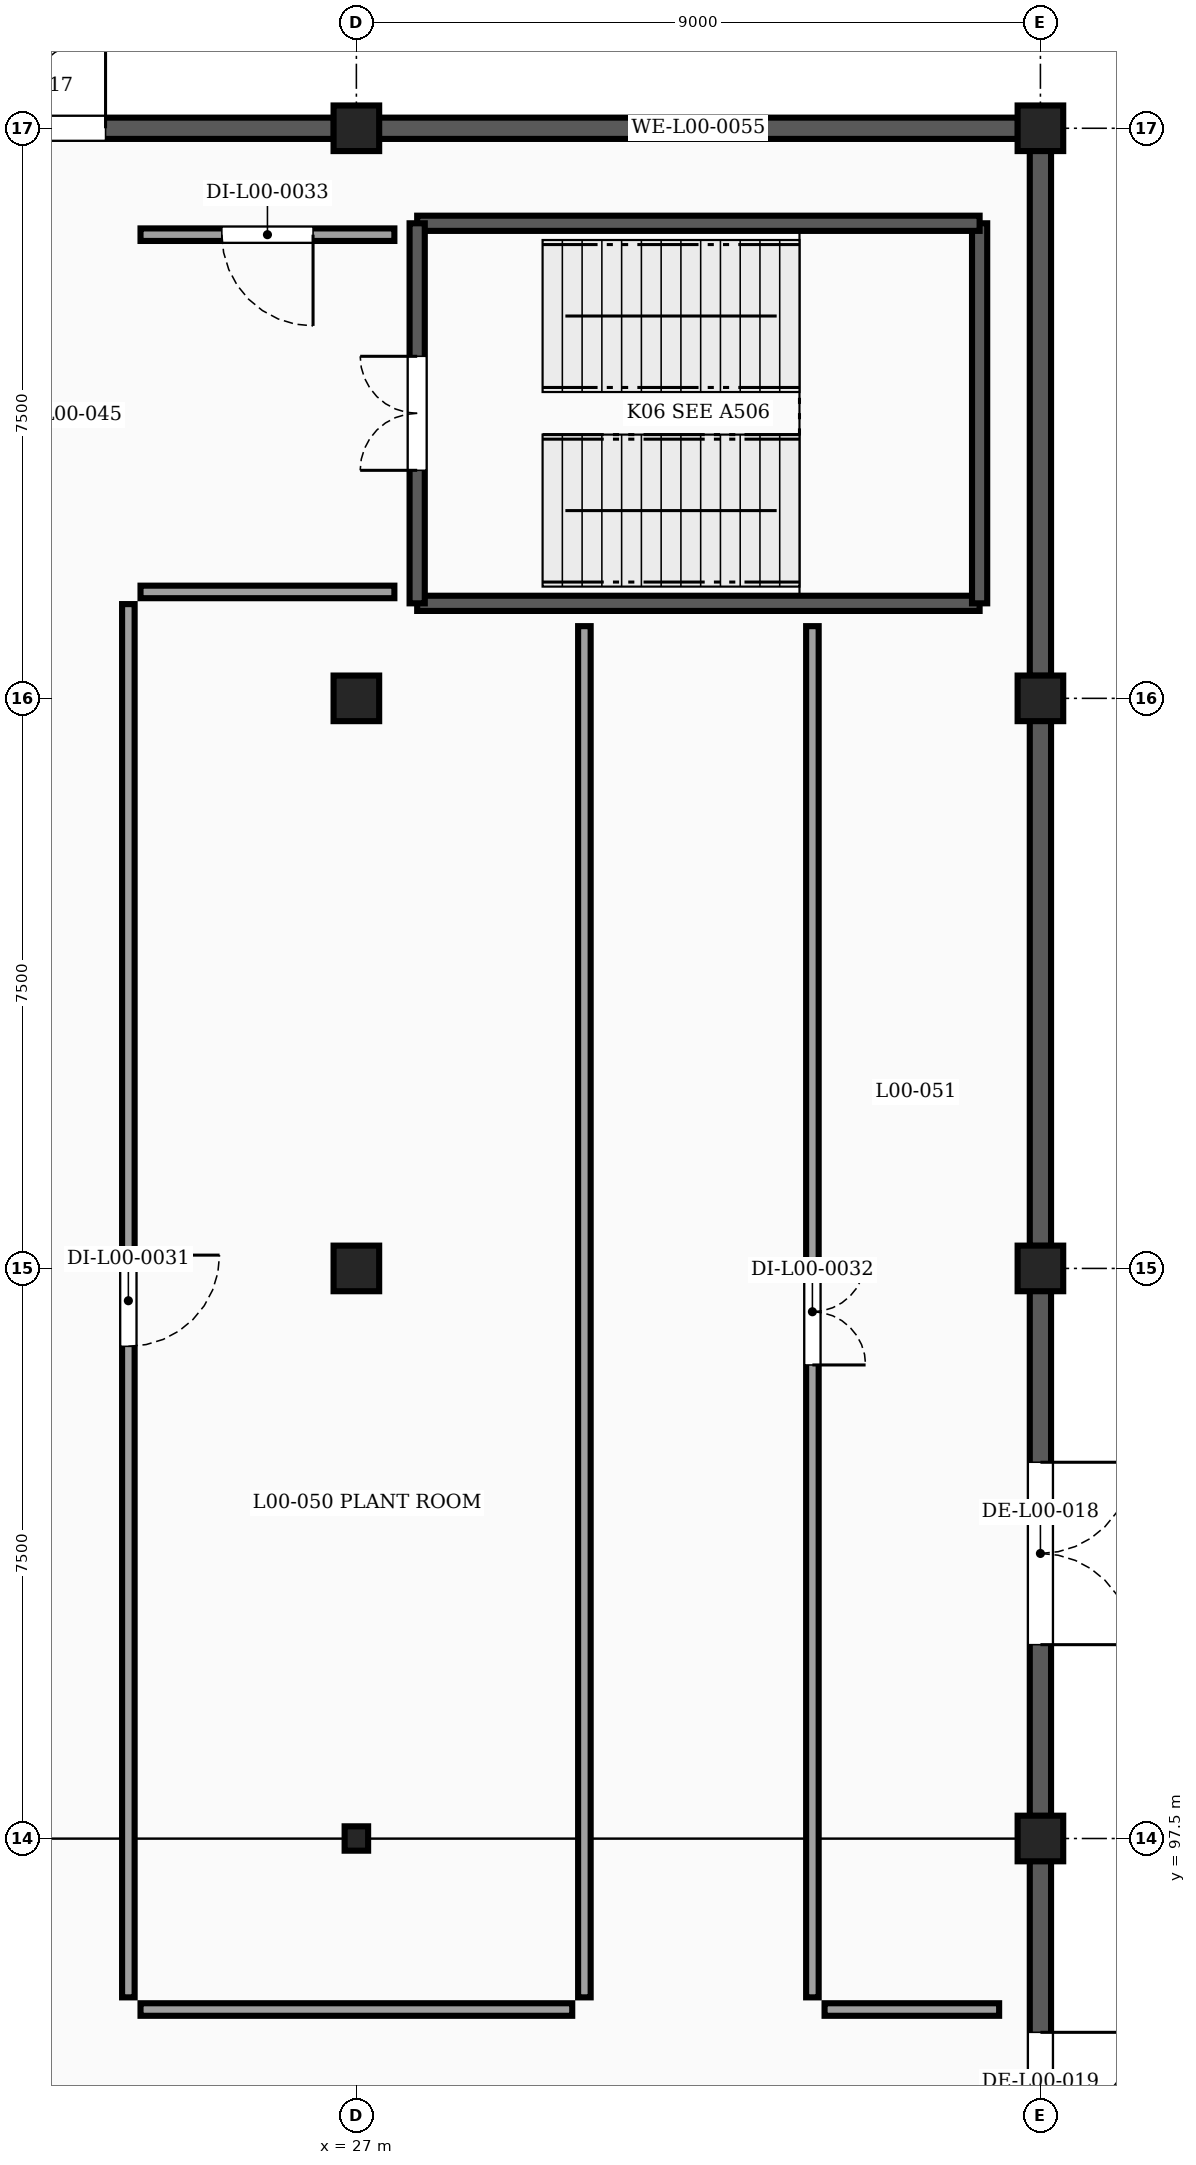
"""IFC4 building model, lengths in metres.
Left out: names, types, materials, properties, quantities, classifications, styles, units other than length and angle.
Written with IfcOpenShell. Run it as: python <this file> out.ifc"""

import sys

from ifc_helpers import new_model, si_unit, direction, frame, frame_2d, origin, origin_2d, place, context, subcontext, project, spatial, rectangle, i_section, extrude, element, fill, save


model = new_model("IFC4")
c1 = context("Model", 3, precision=1e-05, world=origin(), true_north=direction((0.0, 1.0)))
c2 = subcontext(c1, "Body", "Model", "MODEL_VIEW")
j1 = project(units=[si_unit("LENGTHUNIT", "METRE"), si_unit("PLANEANGLEUNIT", "RADIAN")], contexts=[c1])
p1 = place(None, origin())
s1 = spatial("IfcSite", under=j1, at=p1, CompositionType="ELEMENT")
p2 = place(p1, origin())
s2 = spatial("IfcBuilding", under=s1, at=p2, CompositionType="ELEMENT")
p3 = place(p2, origin())
s3 = spatial("IfcBuildingStorey", under=s2, at=p3, CompositionType="ELEMENT", Elevation=0.0)
p4 = place(p3, frame((27.0, 97.5, -0.25), z_axis=(0.0, 0.0, 1.0), x_axis=(1.0, 0.0, 0.0)))
e1 = element("IfcColumn", 1, at=p4, inside=s3, PredefinedType="COLUMN", context=c2, shape_type="SweptSolid", body=[
    extrude(i_section(OverallWidth=0.309, OverallDepth=0.321, WebThickness=0.014, FlangeThickness=0.022, FilletRadius=0.017, at=origin_2d()), origin(), (0.0, 0.0, 1.0), 4.75),
])
for number, where, z_axis, x_axis in (
    (2, (36.0, 97.5, -0.25), (0.0, 0.0, 1.0), (1.0, 0.0, 0.0)),
    (3, (27.0, 105.0, -0.25), (0.0, 0.0, 1.0), (1.0, 0.0, 0.0)),
    (4, (36.0, 105.0, -0.25), (0.0, 0.0, 1.0), (1.0, 0.0, 0.0)),
    (5, (27.0, 112.5, -0.25), (0.0, 0.0, 1.0), (1.0, 0.0, 0.0)),
    (6, (36.0, 112.5, -0.25), (0.0, 0.0, 1.0), (1.0, 0.0, 0.0)),
    (7, (27.0, 120.0, -0.25), (0.0, 0.0, 1.0), (1.0, 0.0, 0.0)),
    (8, (36.0, 120.0, -0.25), (0.0, 0.0, 1.0), (1.0, 0.0, 0.0)),
):
    element("IfcColumn", number, at=place(p3, frame(where, z_axis=z_axis, x_axis=x_axis)), inside=s3, PredefinedType="COLUMN", context=c2, shape_type="SweptSolid", body=[
        extrude(rectangle(XDim=0.6, YDim=0.6, at=origin_2d()), origin(), (0.0, 0.0, 1.0), 4.75),
    ])
p5 = place(p3, frame((18.296, 120.0, 0.0), z_axis=(0.0, 0.0, 1.0), x_axis=(1.0, 0.0, 0.0)))
e9 = element("IfcWall", 9, at=p5, inside=s3, PredefinedType="SOLIDWALL", context=c2, shape_type="SweptSolid", body=[
    extrude(rectangle(XDim=8.408, YDim=0.28, at=frame_2d((4.204, 0.0))), origin(), (0.0, 0.0, 1.0), 3.442),
])
p6 = place(p5, frame((3.004, 0.0, 0.0)))
e10 = element("IfcOpeningElement", 10, at=p6, cuts=e9, PredefinedType="OPENING", context=c2, shape_type="SweptSolid", body=[
    extrude(rectangle(XDim=2.4, YDim=2.2, at=frame_2d((1.2, 1.1))), frame((0.0, 0.15, 0.0), z_axis=(0.0, -1.0, 0.0), x_axis=(1.0, 0.0, 0.0)), (0.0, 0.0, 1.0), 0.3),
])
p7 = place(p3, frame((27.296, 120.0, 0.0), z_axis=(0.0, 0.0, 1.0), x_axis=(1.0, 0.0, 0.0)))
e11 = element("IfcWall", 11, at=p7, inside=s3, PredefinedType="SOLIDWALL", context=c2, shape_type="SweptSolid", body=[
    extrude(rectangle(XDim=8.408, YDim=0.28, at=frame_2d((4.204, 0.0))), origin(), (0.0, 0.0, 1.0), 3.442),
])
for number, where, z_axis, x_axis in (
    (12, (36.0, 119.704, 0.0), (0.0, 0.0, 1.0), (0.0, -1.0, 0.0)),
    (13, (36.0, 112.204, 0.0), (0.0, 0.0, 1.0), (0.0, -1.0, 0.0)),
):
    element("IfcWall", number, at=place(p3, frame(where, z_axis=z_axis, x_axis=x_axis)), inside=s3, PredefinedType="SOLIDWALL", context=c2, shape_type="SweptSolid", body=[
        extrude(rectangle(XDim=6.908, YDim=0.28, at=frame_2d((3.454, 0.0))), origin(), (0.0, 0.0, 1.0), 3.442),
    ])
p8 = place(p3, frame((36.0, 104.704, 0.0), z_axis=(0.0, 0.0, 1.0), x_axis=(0.0, -1.0, 0.0)))
e14 = element("IfcWall", 14, at=p8, inside=s3, PredefinedType="SOLIDWALL", context=c2, shape_type="SweptSolid", body=[
    extrude(rectangle(XDim=6.908, YDim=0.28, at=frame_2d((3.454, 0.0))), origin(), (0.0, 0.0, 1.0), 3.442),
])
p9 = place(p8, frame((2.254, 0.0, 0.0)))
e15 = element("IfcOpeningElement", 15, at=p9, cuts=e14, PredefinedType="OPENING", context=c2, shape_type="SweptSolid", body=[
    extrude(rectangle(XDim=2.4, YDim=2.25, at=frame_2d((1.2, 1.125))), frame((0.0, 0.15, 0.0), z_axis=(0.0, -1.0, 0.0), x_axis=(1.0, 0.0, 0.0)), (0.0, 0.0, 1.0), 0.3),
])
p10 = place(p3, frame((36.0, 97.204, 0.0), z_axis=(0.0, 0.0, 1.0), x_axis=(0.0, -1.0, 0.0)))
e16 = element("IfcWall", 16, at=p10, inside=s3, PredefinedType="SOLIDWALL", context=c2, shape_type="SweptSolid", body=[
    extrude(rectangle(XDim=6.908, YDim=0.28, at=frame_2d((3.454, 0.0))), origin(), (0.0, 0.0, 1.0), 3.442),
])
p11 = place(p10, frame((2.254, 0.0, 0.0)))
e17 = element("IfcOpeningElement", 17, at=p11, cuts=e16, PredefinedType="OPENING", context=c2, shape_type="SweptSolid", body=[
    extrude(rectangle(XDim=2.4, YDim=2.25, at=frame_2d((1.2, 1.125))), frame((0.0, 0.15, 0.0), z_axis=(0.0, -1.0, 0.0), x_axis=(1.0, 0.0, 0.0)), (0.0, 0.0, 1.0), 0.3),
])
p12 = place(p3, frame((27.8, 113.75, 0.0), z_axis=(0.0, 0.0, 1.0), x_axis=(1.0, 0.0, 0.0)))
e18 = element("IfcWall", 18, at=p12, inside=s3, PredefinedType="SHEAR", context=c2, shape_type="SweptSolid", body=[
    extrude(rectangle(XDim=7.4, YDim=0.2, at=frame_2d((3.7, 0.0))), origin(), (0.0, 0.0, 1.0), 4.1),
])
p13 = place(p3, frame((35.2, 113.75, 0.0), z_axis=(0.0, 0.0, 1.0), x_axis=(0.0, 1.0, 0.0)))
e19 = element("IfcWall", 19, at=p13, inside=s3, PredefinedType="SHEAR", context=c2, shape_type="SweptSolid", body=[
    extrude(rectangle(XDim=5.0, YDim=0.2, at=frame_2d((2.5, 0.0))), origin(), (0.0, 0.0, 1.0), 4.1),
])
p14 = place(p3, frame((35.2, 118.75, 0.0), z_axis=(0.0, 0.0, 1.0), x_axis=(-1.0, 0.0, 0.0)))
e20 = element("IfcWall", 20, at=p14, inside=s3, PredefinedType="SHEAR", context=c2, shape_type="SweptSolid", body=[
    extrude(rectangle(XDim=7.4, YDim=0.2, at=frame_2d((3.7, 0.0))), origin(), (0.0, 0.0, 1.0), 4.1),
])
p15 = place(p3, frame((27.8, 113.75, 0.0), z_axis=(0.0, 0.0, 1.0), x_axis=(0.0, 1.0, 0.0)))
e21 = element("IfcWall", 21, at=p15, inside=s3, PredefinedType="SHEAR", context=c2, shape_type="SweptSolid", body=[
    extrude(rectangle(XDim=5.0, YDim=0.2, at=frame_2d((2.5, 0.0))), origin(), (0.0, 0.0, 1.0), 4.1),
])
p16 = place(p15, frame((1.75, 0.0, 0.0)))
e22 = element("IfcOpeningElement", 22, at=p16, cuts=e21, PredefinedType="OPENING", context=c2, shape_type="SweptSolid", body=[
    extrude(rectangle(XDim=1.5, YDim=2.15, at=frame_2d((0.75, 1.075))), frame((0.0, 0.11, 0.0), z_axis=(0.0, -1.0, 0.0), x_axis=(1.0, 0.0, 0.0)), (0.0, 0.0, 1.0), 0.22),
])
p17 = place(p3, frame((27.5, 113.9, 0.0), z_axis=(0.0, 0.0, 1.0), x_axis=(-1.0, 0.0, 0.0)))
e23 = element("IfcWall", 23, at=p17, inside=s3, PredefinedType="PARTITIONING", context=c2, shape_type="SweptSolid", body=[
    extrude(rectangle(XDim=3.34, YDim=0.165, at=frame_2d((1.67, 0.0))), origin(), (0.0, 0.0, 1.0), 4.1),
])
p18 = place(p3, frame((24.0, 113.74, 0.0), z_axis=(0.0, 0.0, 1.0), x_axis=(0.0, -1.0, 0.0)))
e24 = element("IfcWall", 24, at=p18, inside=s3, PredefinedType="PARTITIONING", context=c2, shape_type="SweptSolid", body=[
    extrude(rectangle(XDim=18.33, YDim=0.165, at=frame_2d((9.165, 0.0))), origin(), (0.0, 0.0, 1.0), 3.642),
])
p19 = place(p18, frame((8.565, 0.0, 0.0)))
e25 = element("IfcOpeningElement", 25, at=p19, cuts=e24, PredefinedType="OPENING", context=c2, shape_type="SweptSolid", body=[
    extrude(rectangle(XDim=1.2, YDim=2.15, at=frame_2d((0.6, 1.075))), frame((0.0, 0.093, 0.0), z_axis=(0.0, -1.0, 0.0), x_axis=(1.0, 0.0, 0.0)), (0.0, 0.0, 1.0), 0.185),
])
p20 = place(p3, frame((24.16, 95.25, 0.0), z_axis=(0.0, 0.0, 1.0), x_axis=(1.0, 0.0, 0.0)))
e26 = element("IfcWall", 26, at=p20, inside=s3, PredefinedType="PARTITIONING", context=c2, shape_type="SweptSolid", body=[
    extrude(rectangle(XDim=5.68, YDim=0.165, at=frame_2d((2.84, 0.0))), origin(), (0.0, 0.0, 1.0), 4.1),
])
p21 = place(p3, frame((30.0, 95.41, 0.0), z_axis=(0.0, 0.0, 1.0), x_axis=(0.0, 1.0, 0.0)))
e27 = element("IfcWall", 27, at=p21, inside=s3, PredefinedType="PARTITIONING", context=c2, shape_type="SweptSolid", body=[
    extrude(rectangle(XDim=18.04, YDim=0.165, at=frame_2d((9.02, 0.0))), origin(), (0.0, 0.0, 1.0), 3.642),
])
p22 = place(p3, frame((33.0, 113.45, 0.0), z_axis=(0.0, 0.0, 1.0), x_axis=(0.0, -1.0, 0.0)))
e28 = element("IfcWall", 28, at=p22, inside=s3, PredefinedType="PARTITIONING", context=c2, shape_type="SweptSolid", body=[
    extrude(rectangle(XDim=18.04, YDim=0.165, at=frame_2d((9.02, 0.0))), origin(), (0.0, 0.0, 1.0), 3.642),
])
p23 = place(p22, frame((8.32, 0.0, 0.0)))
e29 = element("IfcOpeningElement", 29, at=p23, cuts=e28, PredefinedType="OPENING", context=c2, shape_type="SweptSolid", body=[
    extrude(rectangle(XDim=1.4, YDim=2.15, at=frame_2d((0.7, 1.075))), frame((0.0, 0.093, 0.0), z_axis=(0.0, -1.0, 0.0), x_axis=(1.0, 0.0, 0.0)), (0.0, 0.0, 1.0), 0.185),
])
p24 = place(p3, frame((33.16, 95.25, 0.0), z_axis=(0.0, 0.0, 1.0), x_axis=(1.0, 0.0, 0.0)))
e30 = element("IfcWall", 30, at=p24, inside=s3, PredefinedType="PARTITIONING", context=c2, shape_type="SweptSolid", body=[
    extrude(rectangle(XDim=2.297, YDim=0.165, at=frame_2d((1.148, 0.0))), origin(), (0.0, 0.0, 1.0), 4.1),
])
p25 = place(p3, frame((27.5, 118.6, 0.0), z_axis=(0.0, 0.0, 1.0), x_axis=(-1.0, 0.0, 0.0)))
e31 = element("IfcWall", 31, at=p25, inside=s3, PredefinedType="PARTITIONING", context=c2, shape_type="SweptSolid", body=[
    extrude(rectangle(XDim=3.34, YDim=0.165, at=frame_2d((1.67, 0.0))), origin(), (0.0, 0.0, 1.0), 4.1),
])
p26 = place(p25, frame((1.07, 0.0, 0.0)))
e32 = element("IfcOpeningElement", 32, at=p26, cuts=e31, PredefinedType="OPENING", context=c2, shape_type="SweptSolid", body=[
    extrude(rectangle(XDim=1.2, YDim=2.15, at=frame_2d((0.6, 1.075))), frame((0.0, 0.093, 0.0), z_axis=(0.0, -1.0, 0.0), x_axis=(1.0, 0.0, 0.0)), (0.0, 0.0, 1.0), 0.185),
])
p27 = place(p6, origin())
e33 = element("IfcDoor", 33, at=p27, inside=s3, OperationType="DOUBLE_DOOR_SINGLE_SWING", PredefinedType="DOOR", context=c2, shape_type="SweptSolid", body=[
    extrude(rectangle(XDim=2.4, YDim=2.2, at=frame_2d((1.2, 1.1))), frame((0.0, 0.025, 0.0), z_axis=(0.0, -1.0, 0.0), x_axis=(1.0, 0.0, 0.0)), (0.0, 0.0, 1.0), 0.05),
])
fill(e10, e33)
p28 = place(p9, origin())
e34 = element("IfcDoor", 34, at=p28, inside=s3, OperationType="DOUBLE_DOOR_SINGLE_SWING", PredefinedType="DOOR", context=c2, shape_type="SweptSolid", body=[
    extrude(rectangle(XDim=2.4, YDim=2.25, at=frame_2d((1.2, 1.125))), frame((0.0, 0.025, 0.0), z_axis=(0.0, -1.0, 0.0), x_axis=(1.0, 0.0, 0.0)), (0.0, 0.0, 1.0), 0.05),
])
fill(e15, e34)
p29 = place(p11, origin())
e35 = element("IfcDoor", 35, at=p29, inside=s3, OperationType="DOUBLE_DOOR_SINGLE_SWING", PredefinedType="DOOR", context=c2, shape_type="SweptSolid", body=[
    extrude(rectangle(XDim=2.4, YDim=2.25, at=frame_2d((1.2, 1.125))), frame((0.0, 0.025, 0.0), z_axis=(0.0, -1.0, 0.0), x_axis=(1.0, 0.0, 0.0)), (0.0, 0.0, 1.0), 0.05),
])
fill(e17, e35)
p30 = place(p16, origin())
e36 = element("IfcDoor", 36, at=p30, inside=s3, OperationType="DOUBLE_DOOR_SINGLE_SWING", PredefinedType="DOOR", context=c2, shape_type="SweptSolid", body=[
    extrude(rectangle(XDim=1.5, YDim=2.15, at=frame_2d((0.75, 1.075))), frame((0.0, 0.025, 0.0), z_axis=(0.0, -1.0, 0.0), x_axis=(1.0, 0.0, 0.0)), (0.0, 0.0, 1.0), 0.05),
])
fill(e22, e36)
p31 = place(p19, origin())
e37 = element("IfcDoor", 37, at=p31, inside=s3, OperationType="SINGLE_SWING_LEFT", PredefinedType="DOOR", context=c2, shape_type="SweptSolid", body=[
    extrude(rectangle(XDim=1.2, YDim=2.15, at=frame_2d((0.6, 1.075))), frame((0.0, 0.025, 0.0), z_axis=(0.0, -1.0, 0.0), x_axis=(1.0, 0.0, 0.0)), (0.0, 0.0, 1.0), 0.05),
])
fill(e25, e37)
p32 = place(p23, origin())
e38 = element("IfcDoor", 38, at=p32, inside=s3, OperationType="DOUBLE_DOOR_SINGLE_SWING", PredefinedType="DOOR", context=c2, shape_type="SweptSolid", body=[
    extrude(rectangle(XDim=1.4, YDim=2.15, at=frame_2d((0.7, 1.075))), frame((0.0, 0.025, 0.0), z_axis=(0.0, -1.0, 0.0), x_axis=(1.0, 0.0, 0.0)), (0.0, 0.0, 1.0), 0.05),
])
fill(e29, e38)
p33 = place(p26, origin())
e39 = element("IfcDoor", 39, at=p33, inside=s3, OperationType="SINGLE_SWING_LEFT", PredefinedType="DOOR", context=c2, shape_type="SweptSolid", body=[
    extrude(rectangle(XDim=1.2, YDim=2.15, at=frame_2d((0.6, 1.075))), frame((0.0, 0.025, 0.0), z_axis=(0.0, -1.0, 0.0), x_axis=(1.0, 0.0, 0.0)), (0.0, 0.0, 1.0), 0.05),
])
fill(e32, e39)
save(model, sys.argv[1])
